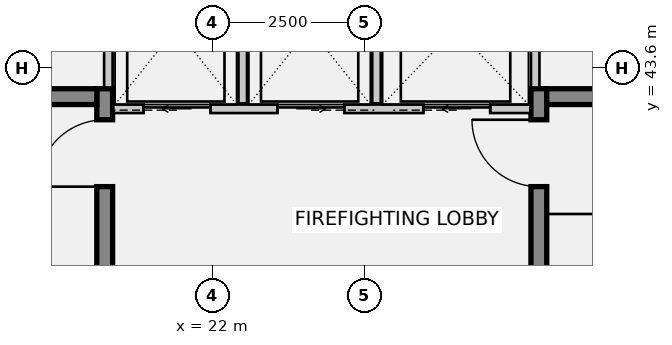
"""IFC4 building model, lengths in metres.
Left out: names, types, materials, properties, quantities, classifications, styles, units other than length and angle.
Written with IfcOpenShell. Run it as: python <this file> out.ifc"""

import sys

from ifc_helpers import new_model, si_unit, direction, frame, frame_2d, origin, origin_2d, place, context, subcontext, project, spatial, rectangle, extrude, source, transform, mapped, element, fill, save


model = new_model("IFC4")
c1 = context("Model", 3, precision=1e-05, world=origin(), true_north=direction((0.0, 1.0)))
c2 = subcontext(c1, "Body", "Model", "MODEL_VIEW")
j1 = project(units=[si_unit("LENGTHUNIT", "METRE"), si_unit("PLANEANGLEUNIT", "RADIAN")], contexts=[c1])
p1 = place(None, origin())
s1 = spatial("IfcSite", under=j1, at=p1, CompositionType="ELEMENT")
p2 = place(p1, origin())
s2 = spatial("IfcBuilding", under=s1, at=p2, CompositionType="ELEMENT")
p3 = place(p2, frame((0.0, 0.0, 309.5)))
s3 = spatial("IfcBuildingStorey", under=s2, at=p3, CompositionType="ELEMENT", Elevation=309.5)
p4 = place(p3, frame((20.23, 34.2, 0.0), z_axis=(0.0, 0.0, 1.0), x_axis=(0.0, 1.0, 0.0)))
e1 = element("IfcWall", 1, at=p4, inside=s3, PredefinedType="SHEAR", context=c2, shape_type="SweptSolid", body=[
    extrude(rectangle(XDim=9.06, YDim=0.26, at=frame_2d((4.53, 0.0))), origin(), (0.0, 0.0, 1.0), 5.4),
])
m1 = source(origin(), c2, "Body", "SweptSolid", [
    extrude(rectangle(XDim=1.1, YDim=2.15, at=frame_2d((0.55, 1.075))), frame((0.0, 0.14, 0.0), z_axis=(0.0, -1.0, 0.0), x_axis=(1.0, 0.0, 0.0)), (0.0, 0.0, 1.0), 0.28),
])
p5 = place(p4, frame((7.45, 0.0, 0.0)))
e2 = element("IfcOpeningElement", 2, at=p5, cuts=e1, PredefinedType="OPENING", context=c2, shape_type="MappedRepresentation", body=[
    mapped(m1, transform((0.0, 0.0, 0.0), scale=1.0)),
])
p6 = place(p3, frame((27.37, 34.2, 0.0), z_axis=(0.0, 0.0, 1.0), x_axis=(0.0, 1.0, 0.0)))
e3 = element("IfcWall", 3, at=p6, inside=s3, PredefinedType="SHEAR", context=c2, shape_type="SweptSolid", body=[
    extrude(rectangle(XDim=9.06, YDim=0.26, at=frame_2d((4.53, 0.0))), origin(), (0.0, 0.0, 1.0), 5.4),
])
p7 = place(p6, frame((7.45, 0.0, 0.0)))
e4 = element("IfcOpeningElement", 4, at=p7, cuts=e3, PredefinedType="OPENING", context=c2, shape_type="MappedRepresentation", body=[
    mapped(m1, transform((0.0, 0.0, 0.0), scale=1.0)),
])
for number, where, z_axis, x_axis in (
    (5, (16.6, 43.13, 0.0), (0.0, 0.0, 1.0), (1.0, 0.0, 0.0)),
    (6, (27.5, 43.13, 0.0), (0.0, 0.0, 1.0), (1.0, 0.0, 0.0)),
):
    element("IfcWall", number, at=place(p3, frame(where, z_axis=z_axis, x_axis=x_axis)), inside=s3, PredefinedType="SHEAR", context=c2, shape_type="SweptSolid", body=[
        extrude(rectangle(XDim=3.5, YDim=0.26, at=frame_2d((1.75, 0.0))), origin(), (0.0, 0.0, 1.0), 5.4),
    ])
p8 = place(p3, frame((20.37, 42.93, 0.0), z_axis=(0.0, 0.0, 1.0), x_axis=(1.0, 0.0, 0.0)))
e7 = element("IfcWall", 7, at=p8, inside=s3, PredefinedType="SOLIDWALL", context=c2, shape_type="SweptSolid", body=[
    extrude(rectangle(XDim=6.86, YDim=0.14, at=frame_2d((3.43, 0.0))), origin(), (0.0, 0.0, 1.0), 5.1),
])
m2 = source(origin(), c2, "Body", "SweptSolid", [
    extrude(rectangle(XDim=1.1, YDim=2.15, at=frame_2d((0.55, 1.075))), frame((0.0, 0.08, 0.0), z_axis=(0.0, -1.0, 0.0), x_axis=(1.0, 0.0, 0.0)), (0.0, 0.0, 1.0), 0.16),
])
p9 = place(p8, frame((0.5, 0.0, 0.0)))
e8 = element("IfcOpeningElement", 8, at=p9, cuts=e7, PredefinedType="OPENING", context=c2, shape_type="MappedRepresentation", body=[
    mapped(m2, transform((0.0, 0.0, 0.0), scale=1.0)),
])
p10 = place(p8, frame((2.7, 0.0, 0.0)))
e9 = element("IfcOpeningElement", 9, at=p10, cuts=e7, PredefinedType="OPENING", context=c2, shape_type="MappedRepresentation", body=[
    mapped(m2, transform((0.0, 0.0, 0.0), scale=1.0)),
])
p11 = place(p8, frame((5.1, 0.0, 0.0)))
e10 = element("IfcOpeningElement", 10, at=p11, cuts=e7, PredefinedType="OPENING", context=c2, shape_type="MappedRepresentation", body=[
    mapped(m2, transform((0.0, 0.0, 0.0), scale=1.0)),
])
for number, where, z_axis, x_axis in (
    (11, (20.29, 43.28, 0.0), (0.0, 0.0, 1.0), (0.0, 1.0, 0.0)),
    (12, (27.31, 43.28, 0.0), (0.0, 0.0, 1.0), (0.0, 1.0, 0.0)),
):
    element("IfcWall", number, at=place(p3, frame(where, z_axis=z_axis, x_axis=x_axis)), inside=s3, PredefinedType="SOLIDWALL", context=c2, shape_type="SweptSolid", body=[
        extrude(rectangle(XDim=2.3, YDim=0.14, at=frame_2d((1.15, 0.0))), origin(), (0.0, 0.0, 1.0), 5.1),
    ])
for number, where, z_axis, x_axis in (
    (13, (22.5, 43.02, 0.0), (0.0, 0.0, 1.0), (0.0, 1.0, 0.0)),
    (14, (24.7, 43.02, 0.0), (0.0, 0.0, 1.0), (0.0, 1.0, 0.0)),
):
    element("IfcWall", number, at=place(p3, frame(where, z_axis=z_axis, x_axis=x_axis)), inside=s3, PredefinedType="SOLIDWALL", context=c2, shape_type="SweptSolid", body=[
        extrude(rectangle(XDim=2.56, YDim=0.14, at=frame_2d((1.28, 0.0))), origin(), (0.0, 0.0, 1.0), 5.1),
    ])
p12 = place(p3, frame((0.0, 0.0, 5.1)))
p13 = place(p12, frame((22.0, 40.2, 0.0)))
p14 = place(p13, frame((0.0, 0.0, 0.25)))
e15 = element("IfcWindow", 15, at=p14, inside=s3, PartitioningType="SINGLE_PANEL", PredefinedType="SKYLIGHT", context=c2, shape_type="SweptSolid", body=[
    extrude(rectangle(XDim=2.2, YDim=2.2, at=origin_2d()), origin(), (0.0, 0.0, 1.0), 0.05),
])
p15 = place(p12, frame((25.0, 40.2, 0.0)))
p16 = place(p15, frame((0.0, 0.0, 0.25)))
e16 = element("IfcWindow", 16, at=p16, inside=s3, PartitioningType="SINGLE_PANEL", PredefinedType="SKYLIGHT", context=c2, shape_type="SweptSolid", body=[
    extrude(rectangle(XDim=2.2, YDim=2.2, at=origin_2d()), origin(), (0.0, 0.0, 1.0), 0.05),
])
p17 = place(p12, frame((28.6, 40.2, 0.0)))
p18 = place(p17, frame((0.0, 0.0, 0.25)))
e17 = element("IfcWindow", 17, at=p18, inside=s3, PartitioningType="SINGLE_PANEL", PredefinedType="LIGHTDOME", context=c2, shape_type="SweptSolid", body=[
    extrude(rectangle(XDim=2.2, YDim=2.2, at=origin_2d()), origin(), (0.0, 0.0, 1.0), 0.05),
])
m3 = source(origin(), c2, "Body", "SweptSolid", [
    extrude(rectangle(XDim=1.1, YDim=2.15, at=frame_2d((0.55, 1.075))), frame((0.0, 0.025, 0.0), z_axis=(0.0, -1.0, 0.0), x_axis=(1.0, 0.0, 0.0)), (0.0, 0.0, 1.0), 0.05),
])
p19 = place(p9, origin())
e18 = element("IfcDoor", 18, at=p19, inside=s3, OperationType="SLIDING_TO_LEFT", PredefinedType="DOOR", context=c2, shape_type="MappedRepresentation", body=[
    mapped(m3, transform((0.0, 0.0, 0.0), scale=1.0)),
])
fill(e8, e18)
p20 = place(p10, origin())
e19 = element("IfcDoor", 19, at=p20, inside=s3, OperationType="SLIDING_TO_RIGHT", PredefinedType="DOOR", context=c2, shape_type="MappedRepresentation", body=[
    mapped(m3, transform((0.0, 0.0, 0.0), scale=1.0)),
])
fill(e9, e19)
m4 = source(origin(), c2, "Body", "SweptSolid", [
    extrude(rectangle(XDim=1.1, YDim=2.15, at=frame_2d((0.55, 1.075))), frame((0.0, 0.025, 0.0), z_axis=(0.0, -1.0, 0.0), x_axis=(1.0, 0.0, 0.0)), (0.0, 0.0, 1.0), 0.05),
])
p21 = place(p11, origin())
e20 = element("IfcDoor", 20, at=p21, inside=s3, OperationType="SLIDING_TO_LEFT", PredefinedType="DOOR", context=c2, shape_type="MappedRepresentation", body=[
    mapped(m4, transform((0.0, 0.0, 0.0), scale=1.0)),
])
fill(e10, e20)
m5 = source(origin(), c2, "Body", "SweptSolid", [
    extrude(rectangle(XDim=1.1, YDim=2.15, at=frame_2d((0.55, 1.075))), frame((0.0, 0.025, 0.0), z_axis=(0.0, -1.0, 0.0), x_axis=(1.0, 0.0, 0.0)), (0.0, 0.0, 1.0), 0.05),
])
p22 = place(p5, origin())
e21 = element("IfcDoor", 21, at=p22, inside=s3, OperationType="SINGLE_SWING_LEFT", PredefinedType="DOOR", context=c2, shape_type="MappedRepresentation", body=[
    mapped(m5, transform((0.0, 0.0, 0.0), scale=1.0)),
])
fill(e2, e21)
p23 = place(p7, origin())
e22 = element("IfcDoor", 22, at=p23, inside=s3, OperationType="SINGLE_SWING_RIGHT", PredefinedType="DOOR", context=c2, shape_type="MappedRepresentation", body=[
    mapped(m5, transform((0.0, 0.0, 0.0), scale=1.0)),
])
fill(e4, e22)
save(model, sys.argv[1])
